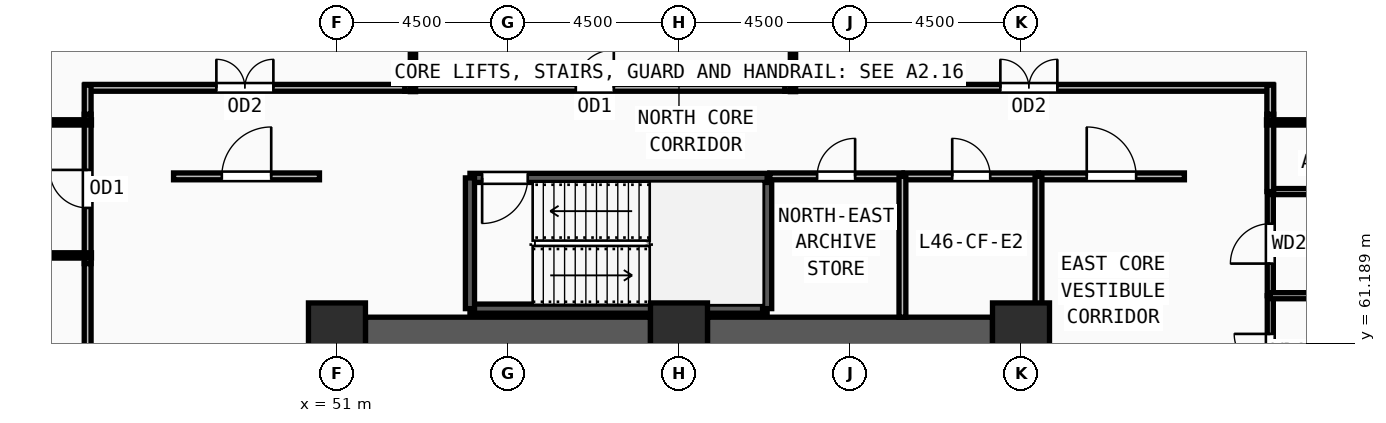
"""IFC4 building model, lengths in metres.
Left out: names, types, materials, properties, quantities, classifications, styles, units other than length and angle.
Written with IfcOpenShell. Run it as: python <this file> out.ifc"""

import sys

from ifc_helpers import new_model, si_unit, direction, frame, frame_2d, origin, origin_2d, place, context, subcontext, project, spatial, rectangle, extrude, source, transform, mapped, element, fill, save


model = new_model("IFC4")
c1 = context("Model", 3, precision=1e-05, world=origin(), true_north=direction((0.0, 1.0)))
c2 = subcontext(c1, "Body", "Model", "MODEL_VIEW")
j1 = project(units=[si_unit("LENGTHUNIT", "METRE"), si_unit("PLANEANGLEUNIT", "RADIAN")], contexts=[c1])
p1 = place(None, origin())
s1 = spatial("IfcSite", under=j1, at=p1, CompositionType="ELEMENT")
p2 = place(p1, origin())
s2 = spatial("IfcBuilding", under=s1, at=p2, CompositionType="ELEMENT")
p3 = place(p2, frame((0.0, 0.0, 177.75)))
s3 = spatial("IfcBuildingStorey", under=s2, at=p3, CompositionType="ELEMENT", Elevation=177.75)
m1 = source(origin(), c2, "Body", "SweptSolid", [
    extrude(rectangle(XDim=1.5, YDim=1.5, at=origin_2d()), origin(), (0.0, 0.0, 1.0), 3.75),
])
for number, where, z_axis, x_axis in (
    (1, (69.0, 61.5, 0.0), (0.0, 0.0, 1.0), (1.0, 0.0, 0.0)),
    (2, (60.0, 61.5, 0.0), (0.0, 0.0, 1.0), (1.0, 0.0, 0.0)),
    (3, (51.0, 61.5, 0.0), (0.0, 0.0, 1.0), (1.0, 0.0, 0.0)),
):
    element("IfcColumn", number, at=place(p3, frame(where, z_axis=z_axis, x_axis=x_axis)), inside=s3, PredefinedType="COLUMN", context=c2, shape_type="MappedRepresentation", body=[
        mapped(m1, transform((0.0, 0.0, 0.0), x_axis=(1.0, 0.0, 0.0), y_axis=(0.0, 1.0, 0.0), z_axis=(0.0, 0.0, 1.0), scale=1.0)),
    ])
for number, where, z_axis, x_axis in (
    (4, (51.75, 61.5, 0.0), (0.0, 0.0, 1.0), (1.0, 0.0, 0.0)),
    (5, (60.75, 61.5, 0.0), (0.0, 0.0, 1.0), (1.0, 0.0, 0.0)),
):
    element("IfcWall", number, at=place(p3, frame(where, z_axis=z_axis, x_axis=x_axis)), inside=s3, PredefinedType="SHEAR", context=c2, shape_type="SweptSolid", body=[
        extrude(rectangle(XDim=7.5, YDim=0.75, at=frame_2d((3.75, 0.0))), origin(), (0.0, 0.0, 1.0), 3.57),
    ])
p4 = place(p3, frame((54.5, 62.1, 0.0), z_axis=(0.0, 0.0, 1.0), x_axis=(1.0, 0.0, 0.0)))
e6 = element("IfcWall", 6, at=p4, inside=s3, PredefinedType="SOLIDWALL", context=c2, shape_type="SweptSolid", body=[
    extrude(rectangle(XDim=7.82, YDim=0.24, at=frame_2d((3.91, 0.0))), origin(), (0.0, 0.0, 1.0), 3.57),
])
p5 = place(p3, frame((62.32, 62.1, 0.0), z_axis=(0.0, 0.0, 1.0), x_axis=(0.0, 1.0, 0.0)))
e7 = element("IfcWall", 7, at=p5, inside=s3, PredefinedType="SOLIDWALL", context=c2, shape_type="SweptSolid", body=[
    extrude(rectangle(XDim=3.44, YDim=0.24, at=frame_2d((1.72, 0.0))), origin(), (0.0, 0.0, 1.0), 3.57),
])
p6 = place(p3, frame((62.32, 65.54, 0.0), z_axis=(0.0, 0.0, 1.0), x_axis=(-1.0, 0.0, 0.0)))
e8 = element("IfcWall", 8, at=p6, inside=s3, PredefinedType="SOLIDWALL", context=c2, shape_type="SweptSolid", body=[
    extrude(rectangle(XDim=7.82, YDim=0.24, at=frame_2d((3.91, 0.0))), origin(), (0.0, 0.0, 1.0), 3.57),
])
m2 = source(origin(), c2, "Body", "SweptSolid", [
    extrude(rectangle(XDim=1.2, YDim=2.2, at=frame_2d((0.6, 1.1))), frame((0.0, 0.13, 0.0), z_axis=(0.0, -1.0, 0.0), x_axis=(1.0, 0.0, 0.0)), (0.0, 0.0, 1.0), 0.26),
])
p7 = place(p6, frame((6.3, 0.0, 0.0)))
e9 = element("IfcOpeningElement", 9, at=p7, cuts=e8, PredefinedType="OPENING", context=c2, shape_type="MappedRepresentation", body=[
    mapped(m2, transform((0.0, 0.0, 0.0), x_axis=(1.0, 0.0, 0.0), y_axis=(0.0, 1.0, 0.0), z_axis=(0.0, 0.0, 1.0), scale=1.0)),
])
p8 = place(p3, frame((54.5, 65.54, 0.0), z_axis=(0.0, 0.0, 1.0), x_axis=(0.0, -1.0, 0.0)))
e10 = element("IfcWall", 10, at=p8, inside=s3, PredefinedType="SOLIDWALL", context=c2, shape_type="SweptSolid", body=[
    extrude(rectangle(XDim=3.44, YDim=0.24, at=frame_2d((1.72, 0.0))), origin(), (0.0, 0.0, 1.0), 3.57),
])
p9 = place(p3, frame((75.56, 59.48, 0.0), z_axis=(0.0, 0.0, 1.0), x_axis=(0.0, 1.0, 0.0)))
e11 = element("IfcWall", 11, at=p9, inside=s3, PredefinedType="PARTITIONING", context=c2, shape_type="SweptSolid", body=[
    extrude(rectangle(XDim=2.96, YDim=0.16, at=frame_2d((1.48, 0.0))), origin(), (0.0, 0.0, 1.0), 3.57),
])
m3 = source(origin(), c2, "Body", "SweptSolid", [
    extrude(rectangle(XDim=0.95, YDim=2.15, at=frame_2d((0.475, 1.075))), frame((0.0, 0.09, 0.0), z_axis=(0.0, -1.0, 0.0), x_axis=(1.0, 0.0, 0.0)), (0.0, 0.0, 1.0), 0.18),
])
p10 = place(p9, frame((1.005, 0.0, 0.0)))
e12 = element("IfcOpeningElement", 12, at=p10, cuts=e11, PredefinedType="OPENING", context=c2, shape_type="MappedRepresentation", body=[
    mapped(m3, transform((0.0, 0.0, 0.0), x_axis=(1.0, 0.0, 0.0), y_axis=(0.0, 1.0, 0.0), z_axis=(0.0, 0.0, 1.0), scale=1.0)),
])
p11 = place(p3, frame((75.56, 62.44, 0.0), z_axis=(0.0, 0.0, 1.0), x_axis=(0.0, 1.0, 0.0)))
e13 = element("IfcWall", 13, at=p11, inside=s3, PredefinedType="PARTITIONING", context=c2, shape_type="SweptSolid", body=[
    extrude(rectangle(XDim=2.74, YDim=0.16, at=frame_2d((1.37, 0.0))), origin(), (0.0, 0.0, 1.0), 3.57),
])
m4 = source(origin(), c2, "Body", "SweptSolid", [
    extrude(rectangle(XDim=1.05, YDim=2.15, at=frame_2d((0.525, 1.075))), frame((0.0, 0.09, 0.0), z_axis=(0.0, -1.0, 0.0), x_axis=(1.0, 0.0, 0.0)), (0.0, 0.0, 1.0), 0.18),
])
p12 = place(p11, frame((0.845, 0.0, 0.0)))
e14 = element("IfcOpeningElement", 14, at=p12, cuts=e13, PredefinedType="OPENING", context=c2, shape_type="MappedRepresentation", body=[
    mapped(m4, transform((0.0, 0.0, 0.0), x_axis=(1.0, 0.0, 0.0), y_axis=(0.0, 1.0, 0.0), z_axis=(0.0, 0.0, 1.0), scale=1.0)),
])
p13 = place(p3, frame((62.39, 65.58, 0.0), z_axis=(0.0, 0.0, 1.0), x_axis=(1.0, 0.0, 0.0)))
e15 = element("IfcWall", 15, at=p13, inside=s3, PredefinedType="PARTITIONING", context=c2, shape_type="SweptSolid", body=[
    extrude(rectangle(XDim=3.49, YDim=0.18, at=frame_2d((1.745, 0.0))), origin(), (0.0, 0.0, 1.0), 3.57),
])
m5 = source(origin(), c2, "Body", "SweptSolid", [
    extrude(rectangle(XDim=1.0, YDim=2.2, at=frame_2d((0.5, 1.1))), frame((0.0, 0.1, 0.0), z_axis=(0.0, -1.0, 0.0), x_axis=(1.0, 0.0, 0.0)), (0.0, 0.0, 1.0), 0.2),
])
p14 = place(p13, frame((1.245, 0.0, 0.0)))
e16 = element("IfcOpeningElement", 16, at=p14, cuts=e15, PredefinedType="OPENING", context=c2, shape_type="MappedRepresentation", body=[
    mapped(m5, transform((0.0, 0.0, 0.0), x_axis=(1.0, 0.0, 0.0), y_axis=(0.0, 1.0, 0.0), z_axis=(0.0, 0.0, 1.0), scale=1.0)),
])
p15 = place(p3, frame((65.92, 65.58, 0.0), z_axis=(0.0, 0.0, 1.0), x_axis=(1.0, 0.0, 0.0)))
e17 = element("IfcWall", 17, at=p15, inside=s3, PredefinedType="PARTITIONING", context=c2, shape_type="SweptSolid", body=[
    extrude(rectangle(XDim=3.54, YDim=0.18, at=frame_2d((1.77, 0.0))), origin(), (0.0, 0.0, 1.0), 3.57),
])
p16 = place(p15, frame((1.27, 0.0, 0.0)))
e18 = element("IfcOpeningElement", 18, at=p16, cuts=e17, PredefinedType="OPENING", context=c2, shape_type="MappedRepresentation", body=[
    mapped(m5, transform((0.0, 0.0, 0.0), x_axis=(1.0, 0.0, 0.0), y_axis=(0.0, 1.0, 0.0), z_axis=(0.0, 0.0, 1.0), scale=1.0)),
])
p17 = place(p3, frame((46.7, 65.58, 0.0), z_axis=(0.0, 0.0, 1.0), x_axis=(1.0, 0.0, 0.0)))
e19 = element("IfcWall", 19, at=p17, inside=s3, PredefinedType="PARTITIONING", context=c2, shape_type="SweptSolid", body=[
    extrude(rectangle(XDim=3.84, YDim=0.18, at=frame_2d((1.92, 0.0))), origin(), (0.0, 0.0, 1.0), 3.57),
])
m6 = source(origin(), c2, "Body", "SweptSolid", [
    extrude(rectangle(XDim=1.3, YDim=2.2, at=frame_2d((0.65, 1.1))), frame((0.0, 0.1, 0.0), z_axis=(0.0, -1.0, 0.0), x_axis=(1.0, 0.0, 0.0)), (0.0, 0.0, 1.0), 0.2),
])
p18 = place(p17, frame((1.27, 0.0, 0.0)))
e20 = element("IfcOpeningElement", 20, at=p18, cuts=e19, PredefinedType="OPENING", context=c2, shape_type="MappedRepresentation", body=[
    mapped(m6, transform((0.0, 0.0, 0.0), x_axis=(1.0, 0.0, 0.0), y_axis=(0.0, 1.0, 0.0), z_axis=(0.0, 0.0, 1.0), scale=1.0)),
])
p19 = place(p3, frame((69.46, 65.58, 0.0), z_axis=(0.0, 0.0, 1.0), x_axis=(1.0, 0.0, 0.0)))
e21 = element("IfcWall", 21, at=p19, inside=s3, PredefinedType="PARTITIONING", context=c2, shape_type="SweptSolid", body=[
    extrude(rectangle(XDim=3.84, YDim=0.18, at=frame_2d((1.92, 0.0))), origin(), (0.0, 0.0, 1.0), 3.57),
])
p20 = place(p19, frame((1.27, 0.0, 0.0)))
e22 = element("IfcOpeningElement", 22, at=p20, cuts=e21, PredefinedType="OPENING", context=c2, shape_type="MappedRepresentation", body=[
    mapped(m6, transform((0.0, 0.0, 0.0), x_axis=(1.0, 0.0, 0.0), y_axis=(0.0, 1.0, 0.0), z_axis=(0.0, 0.0, 1.0), scale=1.0)),
])
p21 = place(p3, frame((62.785, 67.91, 0.0), z_axis=(0.0, 0.0, 1.0), x_axis=(1.0, 0.0, 0.0)))
e23 = element("IfcWall", 23, at=p21, inside=s3, PredefinedType="PARTITIONING", context=c2, shape_type="SweptSolid", body=[
    extrude(rectangle(XDim=12.845, YDim=0.18, at=frame_2d((6.422, 0.0))), origin(), (0.0, 0.0, 1.0), 3.57),
])
m7 = source(origin(), c2, "Body", "SweptSolid", [
    extrude(rectangle(XDim=1.5, YDim=2.2, at=frame_2d((0.75, 1.1))), frame((0.0, 0.1, 0.0), z_axis=(0.0, -1.0, 0.0), x_axis=(1.0, 0.0, 0.0)), (0.0, 0.0, 1.0), 0.2),
])
p22 = place(p21, frame((5.672, 0.0, 0.0)))
e24 = element("IfcOpeningElement", 24, at=p22, cuts=e23, PredefinedType="OPENING", context=c2, shape_type="MappedRepresentation", body=[
    mapped(m7, transform((0.0, 0.0, 0.0), x_axis=(1.0, 0.0, 0.0), y_axis=(0.0, 1.0, 0.0), z_axis=(0.0, 0.0, 1.0), scale=1.0)),
])
p23 = place(p3, frame((52.785, 67.91, 0.0), z_axis=(0.0, 0.0, 1.0), x_axis=(1.0, 0.0, 0.0)))
e25 = element("IfcWall", 25, at=p23, inside=s3, PredefinedType="PARTITIONING", context=c2, shape_type="SweptSolid", body=[
    extrude(rectangle(XDim=10.0, YDim=0.18, at=frame_2d((5.0, 0.0))), origin(), (0.0, 0.0, 1.0), 3.57),
])
p24 = place(p23, frame((4.5, 0.0, 0.0)))
e26 = element("IfcOpeningElement", 26, at=p24, cuts=e25, PredefinedType="OPENING", context=c2, shape_type="MappedRepresentation", body=[
    mapped(m5, transform((0.0, 0.0, 0.0), x_axis=(1.0, 0.0, 0.0), y_axis=(0.0, 1.0, 0.0), z_axis=(0.0, 0.0, 1.0), scale=1.0)),
])
p25 = place(p3, frame((44.37, 67.91, 0.0), z_axis=(0.0, 0.0, 1.0), x_axis=(1.0, 0.0, 0.0)))
e27 = element("IfcWall", 27, at=p25, inside=s3, PredefinedType="PARTITIONING", context=c2, shape_type="SweptSolid", body=[
    extrude(rectangle(XDim=8.415, YDim=0.18, at=frame_2d((4.208, 0.0))), origin(), (0.0, 0.0, 1.0), 3.57),
])
p26 = place(p25, frame((3.457, 0.0, 0.0)))
e28 = element("IfcOpeningElement", 28, at=p26, cuts=e27, PredefinedType="OPENING", context=c2, shape_type="MappedRepresentation", body=[
    mapped(m7, transform((0.0, 0.0, 0.0), x_axis=(1.0, 0.0, 0.0), y_axis=(0.0, 1.0, 0.0), z_axis=(0.0, 0.0, 1.0), scale=1.0)),
])
p27 = place(p3, frame((44.44, 63.285, 0.0), z_axis=(0.0, 0.0, 1.0), x_axis=(0.0, 1.0, 0.0)))
e29 = element("IfcWall", 29, at=p27, inside=s3, PredefinedType="PARTITIONING", context=c2, shape_type="SweptSolid", body=[
    extrude(rectangle(XDim=3.93, YDim=0.18, at=frame_2d((1.965, 0.0))), origin(), (0.0, 0.0, 1.0), 3.57),
])
p28 = place(p27, frame((1.465, 0.0, 0.0)))
e30 = element("IfcOpeningElement", 30, at=p28, cuts=e29, PredefinedType="OPENING", context=c2, shape_type="MappedRepresentation", body=[
    mapped(m5, transform((0.0, 0.0, 0.0), x_axis=(1.0, 0.0, 0.0), y_axis=(0.0, 1.0, 0.0), z_axis=(0.0, 0.0, 1.0), scale=1.0)),
])
for number, where, z_axis, x_axis in (
    (31, (75.56, 62.44, 0.0), (0.0, 0.0, 1.0), (1.0, 0.0, 0.0)),
    (32, (75.56, 65.18, 0.0), (0.0, 0.0, 1.0), (1.0, 0.0, 0.0)),
):
    element("IfcWall", number, at=place(p3, frame(where, z_axis=z_axis, x_axis=x_axis)), inside=s3, PredefinedType="PARTITIONING", context=c2, shape_type="SweptSolid", body=[
        extrude(rectangle(XDim=4.46, YDim=0.16, at=frame_2d((2.23, 0.0))), origin(), (0.0, 0.0, 1.0), 3.57),
    ])
p29 = place(p3, frame((65.88, 61.875, 0.0), z_axis=(0.0, 0.0, 1.0), x_axis=(0.0, 1.0, 0.0)))
e33 = element("IfcWall", 33, at=p29, inside=s3, PredefinedType="PARTITIONING", context=c2, shape_type="SweptSolid", body=[
    extrude(rectangle(XDim=3.705, YDim=0.18, at=frame_2d((1.853, 0.0))), origin(), (0.0, 0.0, 1.0), 3.57),
])
p30 = place(p3, frame((69.46, 61.95, 0.0), z_axis=(0.0, 0.0, 1.0), x_axis=(0.0, 1.0, 0.0)))
e34 = element("IfcWall", 34, at=p30, inside=s3, PredefinedType="PARTITIONING", context=c2, shape_type="SweptSolid", body=[
    extrude(rectangle(XDim=3.63, YDim=0.18, at=frame_2d((1.815, 0.0))), origin(), (0.0, 0.0, 1.0), 3.57),
])
p31 = place(p3, frame((75.56, 67.215, 0.0), z_axis=(0.0, 0.0, 1.0), x_axis=(0.0, -1.0, 0.0)))
e35 = element("IfcWall", 35, at=p31, inside=s3, PredefinedType="PARTITIONING", context=c2, shape_type="SweptSolid", body=[
    extrude(rectangle(XDim=2.035, YDim=0.18, at=frame_2d((1.018, 0.0))), origin(), (0.0, 0.0, 1.0), 3.57),
])
for number, where, z_axis, x_axis in (
    (36, (75.56, 67.98, 0.0), (0.0, 0.0, 1.0), (0.0, -1.0, 0.0)),
    (37, (44.44, 67.215, 0.0), (0.0, 0.0, 1.0), (0.0, 1.0, 0.0)),
):
    element("IfcWall", number, at=place(p3, frame(where, z_axis=z_axis, x_axis=x_axis)), inside=s3, PredefinedType="PARTITIONING", context=c2, shape_type="SweptSolid", body=[
        extrude(rectangle(XDim=0.765, YDim=0.18, at=frame_2d((0.382, 0.0))), origin(), (0.0, 0.0, 1.0), 3.57),
    ])
p32 = place(p3, frame((44.44, 56.19, 0.0), z_axis=(0.0, 0.0, 1.0), x_axis=(0.0, 1.0, 0.0)))
e38 = element("IfcWall", 38, at=p32, inside=s3, PredefinedType="PARTITIONING", context=c2, shape_type="SweptSolid", body=[
    extrude(rectangle(XDim=7.095, YDim=0.18, at=frame_2d((3.547, 0.0))), origin(), (0.0, 0.0, 1.0), 3.57),
])
p33 = place(p3, frame((44.54, 63.5, 0.0), z_axis=(0.0, 0.0, 1.0), x_axis=(-1.0, 0.0, 0.0)))
e39 = element("IfcWall", 39, at=p33, inside=s3, PredefinedType="PARTITIONING", context=c2, shape_type="SweptSolid", body=[
    extrude(rectangle(XDim=17.733, YDim=0.14, at=frame_2d((8.867, 0.0))), origin(), (0.0, 0.0, 1.0), 2.755),
])
p34 = place(p3, frame((44.54, 67.0, 0.0), z_axis=(0.0, 0.0, 1.0), x_axis=(-1.0, 0.0, 0.0)))
e40 = element("IfcWall", 40, at=p34, inside=s3, PredefinedType="PARTITIONING", context=c2, shape_type="SweptSolid", body=[
    extrude(rectangle(XDim=19.48, YDim=0.14, at=frame_2d((9.74, 0.0))), origin(), (0.0, 0.0, 1.0), 2.755),
])
p35 = place(p3, frame((75.46, 67.0, 0.0), z_axis=(0.0, 0.0, 1.0), x_axis=(1.0, 0.0, 0.0)))
e41 = element("IfcWall", 41, at=p35, inside=s3, PredefinedType="PARTITIONING", context=c2, shape_type="SweptSolid", body=[
    extrude(rectangle(XDim=19.489, YDim=0.14, at=frame_2d((9.745, 0.0))), origin(), (0.0, 0.0, 1.0), 2.755),
])
p36 = place(p3, frame((53.0, 67.81, 0.0), z_axis=(0.0, 0.0, 1.0), x_axis=(0.0, 1.0, 0.0)))
e42 = element("IfcWall", 42, at=p36, inside=s3, PredefinedType="PARTITIONING", context=c2, shape_type="SweptSolid", body=[
    extrude(rectangle(XDim=11.538, YDim=0.14, at=frame_2d((5.769, 0.0))), origin(), (0.0, 0.0, 1.0), 3.57),
])
p37 = place(p3, frame((63.0, 67.81, 0.0), z_axis=(0.0, 0.0, 1.0), x_axis=(0.0, 1.0, 0.0)))
e43 = element("IfcWall", 43, at=p37, inside=s3, PredefinedType="PARTITIONING", context=c2, shape_type="SweptSolid", body=[
    extrude(rectangle(XDim=11.511, YDim=0.14, at=frame_2d((5.755, 0.0))), origin(), (0.0, 0.0, 1.0), 3.57),
])
m8 = source(origin(), c2, "Body", "SweptSolid", [
    extrude(rectangle(XDim=1.2, YDim=2.2, at=frame_2d((0.6, 1.1))), frame((0.0, 0.025, 0.0), z_axis=(0.0, -1.0, 0.0), x_axis=(1.0, 0.0, 0.0)), (0.0, 0.0, 1.0), 0.05),
])
p38 = place(p7, origin())
e44 = element("IfcDoor", 44, at=p38, inside=s3, OperationType="SINGLE_SWING_RIGHT", PredefinedType="DOOR", context=c2, shape_type="MappedRepresentation", body=[
    mapped(m8, transform((0.0, 0.0, 0.0), x_axis=(1.0, 0.0, 0.0), y_axis=(0.0, 1.0, 0.0), z_axis=(0.0, 0.0, 1.0), scale=1.0)),
])
fill(e9, e44)
m9 = source(origin(), c2, "Body", "SweptSolid", [
    extrude(rectangle(XDim=0.95, YDim=2.15, at=frame_2d((0.475, 1.075))), frame((0.0, 0.025, 0.0), z_axis=(0.0, -1.0, 0.0), x_axis=(1.0, 0.0, 0.0)), (0.0, 0.0, 1.0), 0.05),
])
p39 = place(p10, origin())
e45 = element("IfcDoor", 45, at=p39, inside=s3, OperationType="SINGLE_SWING_RIGHT", PredefinedType="DOOR", context=c2, shape_type="MappedRepresentation", body=[
    mapped(m9, transform((0.0, 0.0, 0.0), x_axis=(1.0, 0.0, 0.0), y_axis=(0.0, 1.0, 0.0), z_axis=(0.0, 0.0, 1.0), scale=1.0)),
])
fill(e12, e45)
m10 = source(origin(), c2, "Body", "SweptSolid", [
    extrude(rectangle(XDim=1.05, YDim=2.15, at=frame_2d((0.525, 1.075))), frame((0.0, 0.025, 0.0), z_axis=(0.0, -1.0, 0.0), x_axis=(1.0, 0.0, 0.0)), (0.0, 0.0, 1.0), 0.05),
])
p40 = place(p12, origin())
e46 = element("IfcDoor", 46, at=p40, inside=s3, OperationType="SINGLE_SWING_LEFT", PredefinedType="DOOR", context=c2, shape_type="MappedRepresentation", body=[
    mapped(m10, transform((0.0, 0.0, 0.0), x_axis=(1.0, 0.0, 0.0), y_axis=(0.0, 1.0, 0.0), z_axis=(0.0, 0.0, 1.0), scale=1.0)),
])
fill(e14, e46)
m11 = source(origin(), c2, "Body", "SweptSolid", [
    extrude(rectangle(XDim=1.0, YDim=2.2, at=frame_2d((0.5, 1.1))), frame((0.0, 0.025, 0.0), z_axis=(0.0, -1.0, 0.0), x_axis=(1.0, 0.0, 0.0)), (0.0, 0.0, 1.0), 0.05),
])
p41 = place(p14, origin())
e47 = element("IfcDoor", 47, at=p41, inside=s3, OperationType="SINGLE_SWING_RIGHT", PredefinedType="DOOR", context=c2, shape_type="MappedRepresentation", body=[
    mapped(m11, transform((0.0, 0.0, 0.0), x_axis=(1.0, 0.0, 0.0), y_axis=(0.0, 1.0, 0.0), z_axis=(0.0, 0.0, 1.0), scale=1.0)),
])
fill(e16, e47)
p42 = place(p16, origin())
e48 = element("IfcDoor", 48, at=p42, inside=s3, OperationType="SINGLE_SWING_LEFT", PredefinedType="DOOR", context=c2, shape_type="MappedRepresentation", body=[
    mapped(m11, transform((0.0, 0.0, 0.0), x_axis=(1.0, 0.0, 0.0), y_axis=(0.0, 1.0, 0.0), z_axis=(0.0, 0.0, 1.0), scale=1.0)),
])
fill(e18, e48)
m12 = source(origin(), c2, "Body", "SweptSolid", [
    extrude(rectangle(XDim=1.3, YDim=2.2, at=frame_2d((0.65, 1.1))), frame((0.0, 0.025, 0.0), z_axis=(0.0, -1.0, 0.0), x_axis=(1.0, 0.0, 0.0)), (0.0, 0.0, 1.0), 0.05),
])
p43 = place(p18, origin())
e49 = element("IfcDoor", 49, at=p43, inside=s3, OperationType="SINGLE_SWING_RIGHT", PredefinedType="DOOR", context=c2, shape_type="MappedRepresentation", body=[
    mapped(m12, transform((0.0, 0.0, 0.0), x_axis=(1.0, 0.0, 0.0), y_axis=(0.0, 1.0, 0.0), z_axis=(0.0, 0.0, 1.0), scale=1.0)),
])
fill(e20, e49)
p44 = place(p20, origin())
e50 = element("IfcDoor", 50, at=p44, inside=s3, OperationType="SINGLE_SWING_LEFT", PredefinedType="DOOR", context=c2, shape_type="MappedRepresentation", body=[
    mapped(m12, transform((0.0, 0.0, 0.0), x_axis=(1.0, 0.0, 0.0), y_axis=(0.0, 1.0, 0.0), z_axis=(0.0, 0.0, 1.0), scale=1.0)),
])
fill(e22, e50)
m13 = source(origin(), c2, "Body", "SweptSolid", [
    extrude(rectangle(XDim=1.5, YDim=2.2, at=frame_2d((0.75, 1.1))), frame((0.0, 0.025, 0.0), z_axis=(0.0, -1.0, 0.0), x_axis=(1.0, 0.0, 0.0)), (0.0, 0.0, 1.0), 0.05),
])
p45 = place(p22, origin())
e51 = element("IfcDoor", 51, at=p45, inside=s3, OperationType="DOUBLE_DOOR_SINGLE_SWING", PredefinedType="DOOR", context=c2, shape_type="MappedRepresentation", body=[
    mapped(m13, transform((0.0, 0.0, 0.0), x_axis=(1.0, 0.0, 0.0), y_axis=(0.0, 1.0, 0.0), z_axis=(0.0, 0.0, 1.0), scale=1.0)),
])
fill(e24, e51)
p46 = place(p24, origin())
e52 = element("IfcDoor", 52, at=p46, inside=s3, OperationType="SINGLE_SWING_RIGHT", PredefinedType="DOOR", context=c2, shape_type="MappedRepresentation", body=[
    mapped(m11, transform((0.0, 0.0, 0.0), x_axis=(1.0, 0.0, 0.0), y_axis=(0.0, 1.0, 0.0), z_axis=(0.0, 0.0, 1.0), scale=1.0)),
])
fill(e26, e52)
p47 = place(p26, origin())
e53 = element("IfcDoor", 53, at=p47, inside=s3, OperationType="DOUBLE_DOOR_SINGLE_SWING", PredefinedType="DOOR", context=c2, shape_type="MappedRepresentation", body=[
    mapped(m13, transform((0.0, 0.0, 0.0), x_axis=(1.0, 0.0, 0.0), y_axis=(0.0, 1.0, 0.0), z_axis=(0.0, 0.0, 1.0), scale=1.0)),
])
fill(e28, e53)
p48 = place(p28, origin())
e54 = element("IfcDoor", 54, at=p48, inside=s3, OperationType="SINGLE_SWING_RIGHT", PredefinedType="DOOR", context=c2, shape_type="MappedRepresentation", body=[
    mapped(m11, transform((0.0, 0.0, 0.0), x_axis=(1.0, 0.0, 0.0), y_axis=(0.0, 1.0, 0.0), z_axis=(0.0, 0.0, 1.0), scale=1.0)),
])
fill(e30, e54)
save(model, sys.argv[1])
